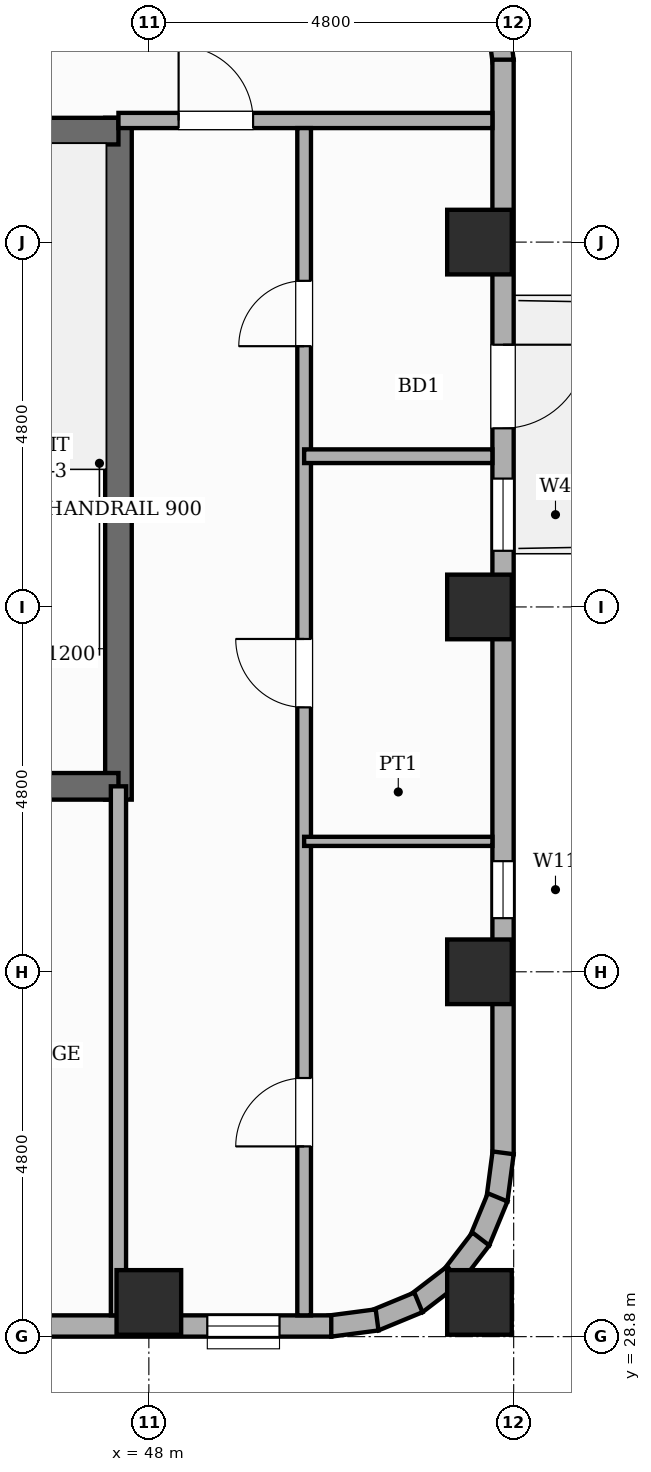
"""IFC4 building model, lengths in metres.
Left out: names, types, materials, properties, quantities, classifications, styles, units other than length and angle.
Written with IfcOpenShell. Run it as: python <this file> out.ifc"""

import sys

from ifc_helpers import new_model, si_unit, direction, frame, frame_2d, origin, origin_2d, place, context, subcontext, project, spatial, rectangle, extrude, element, fill, save


model = new_model("IFC4")
c1 = context("Model", 3, precision=1e-05, world=origin(), true_north=direction((0.0, 1.0)))
c2 = subcontext(c1, "Body", "Model", "MODEL_VIEW")
j1 = project(units=[si_unit("LENGTHUNIT", "METRE"), si_unit("PLANEANGLEUNIT", "RADIAN")], contexts=[c1])
p1 = place(None, origin())
s1 = spatial("IfcSite", under=j1, at=p1, CompositionType="ELEMENT")
p2 = place(p1, origin())
s2 = spatial("IfcBuilding", under=s1, at=p2, CompositionType="ELEMENT")
p3 = place(p2, frame((0.0, 0.0, 207.4)))
s3 = spatial("IfcBuildingStorey", under=s2, at=p3, CompositionType="ELEMENT", Elevation=207.4)
p4 = place(p3, frame((47.6, 35.865, 0.0), z_axis=(0.0, 0.0, 1.0), x_axis=(0.0, 1.0, 0.0)))
e1 = element("IfcWall", 1, at=p4, inside=s3, PredefinedType="SHEAR", context=c2, shape_type="SweptSolid", body=[
    extrude(rectangle(XDim=8.97, YDim=0.35, at=frame_2d((4.485, 0.0))), origin(), (0.0, 0.0, 1.0), 3.6),
])
for number, where, z_axis, x_axis in (
    (2, (44.02, 36.04, 0.0), (0.0, 0.0, 1.0), (1.0, 0.0, 0.0)),
    (3, (44.02, 44.66, 0.0), (0.0, 0.0, 1.0), (1.0, 0.0, 0.0)),
):
    element("IfcWall", number, at=place(p3, frame(where, z_axis=z_axis, x_axis=x_axis)), inside=s3, PredefinedType="SHEAR", context=c2, shape_type="SweptSolid", body=[
        extrude(rectangle(XDim=3.58, YDim=0.35, at=frame_2d((1.79, 0.0))), origin(), (0.0, 0.0, 1.0), 3.6),
    ])
for number, where, z_axis, x_axis in (
    (4, (48.0, 29.25, 0.0), (0.0, 0.0, 1.0), (1.0, 0.0, 0.0)),
    (5, (52.35, 29.25, 0.0), (0.0, 0.0, 1.0), (1.0, 0.0, 0.0)),
    (6, (52.35, 33.6, 0.0), (0.0, 0.0, 1.0), (1.0, 0.0, 0.0)),
    (7, (52.35, 38.4, 0.0), (0.0, 0.0, 1.0), (1.0, 0.0, 0.0)),
    (8, (52.35, 43.2, 0.0), (0.0, 0.0, 1.0), (1.0, 0.0, 0.0)),
):
    element("IfcColumn", number, at=place(p3, frame(where, z_axis=z_axis, x_axis=x_axis)), inside=s3, PredefinedType="COLUMN", context=c2, shape_type="SweptSolid", body=[
        extrude(rectangle(XDim=0.85, YDim=0.85, at=origin_2d()), origin(), (0.0, 0.0, 1.0), 3.6),
    ])
p5 = place(p3, frame((52.579, 46.203, 0.0), z_axis=(0.0, 0.0, 1.0), x_axis=(0.130555323746, -0.9914410257, 0.0)))
e9 = element("IfcWall", 9, at=p5, inside=s3, PredefinedType="STANDARD", context=c2, shape_type="SweptSolid", body=[
    extrude(rectangle(XDim=0.626, YDim=0.28, at=frame_2d((0.313, 0.0))), origin(), (0.0, 0.0, 1.0), 2.66),
])
p6 = place(p3, frame((52.66, 45.6, 0.0), z_axis=(0.0, 0.0, 1.0), x_axis=(0.0, -1.0, 0.0)))
e10 = element("IfcWall", 10, at=p6, inside=s3, PredefinedType="STANDARD", context=c2, shape_type="SweptSolid", body=[
    extrude(rectangle(XDim=14.4, YDim=0.28, at=frame_2d((7.2, 0.0))), origin(), (0.0, 0.0, 1.0), 2.66),
])
p7 = place(p6, frame((3.75, 0.0, 0.0)))
e11 = element("IfcOpeningElement", 11, at=p7, cuts=e10, PredefinedType="OPENING", context=c2, shape_type="SweptSolid", body=[
    extrude(rectangle(XDim=1.1, YDim=2.15, at=frame_2d((0.55, 1.075))), frame((0.0, 0.15, 0.0), z_axis=(0.0, -1.0, 0.0), x_axis=(1.0, 0.0, 0.0)), (0.0, 0.0, 1.0), 0.3),
])
p8 = place(p6, frame((10.544, 0.0, 0.45)))
e12 = element("IfcOpeningElement", 12, at=p8, cuts=e10, PredefinedType="OPENING", context=c2, shape_type="SweptSolid", body=[
    extrude(rectangle(XDim=0.75, YDim=1.8, at=frame_2d((0.375, 0.9))), frame((0.0, 0.15, 0.0), z_axis=(0.0, -1.0, 0.0), x_axis=(1.0, 0.0, 0.0)), (0.0, 0.0, 1.0), 0.3),
])
p9 = place(p6, frame((5.511, 0.0, 0.45)))
e13 = element("IfcOpeningElement", 13, at=p9, cuts=e10, PredefinedType="OPENING", context=c2, shape_type="SweptSolid", body=[
    extrude(rectangle(XDim=0.95, YDim=1.8, at=frame_2d((0.475, 0.9))), frame((0.0, 0.15, 0.0), z_axis=(0.0, -1.0, 0.0), x_axis=(1.0, 0.0, 0.0)), (0.0, 0.0, 1.0), 0.3),
])
p10 = place(p3, frame((52.661, 31.218, 0.0), z_axis=(0.0, 0.0, 1.0), x_axis=(-0.130555323746, -0.9914410257, 0.0)))
e14 = element("IfcWall", 14, at=p10, inside=s3, PredefinedType="STANDARD", context=c2, shape_type="SweptSolid", body=[
    extrude(rectangle(XDim=0.626, YDim=0.28, at=frame_2d((0.313, 0.0))), origin(), (0.0, 0.0, 1.0), 2.66),
])
p11 = place(p3, frame((52.589, 30.632, 0.0), z_axis=(0.0, 0.0, 1.0), x_axis=(-0.382787856107, -0.923836271867, 0.0)))
e15 = element("IfcWall", 15, at=p11, inside=s3, PredefinedType="STANDARD", context=c2, shape_type="SweptSolid", body=[
    extrude(rectangle(XDim=0.626, YDim=0.28, at=frame_2d((0.313, 0.0))), origin(), (0.0, 0.0, 1.0), 2.66),
])
for number, where, z_axis, x_axis in (
    (16, (52.367, 30.085, 0.0), (0.0, 0.0, 1.0), (-0.609, -0.793, 0.0)),
    (17, (52.012, 29.614, 0.0), (0.0, 0.0, 1.0), (-0.793, -0.609, 0.0)),
    (18, (51.546, 29.251, 0.0), (0.0, 0.0, 1.0), (-0.924, -0.383, 0.0)),
):
    element("IfcWall", number, at=place(p3, frame(where, z_axis=z_axis, x_axis=x_axis)), inside=s3, PredefinedType="STANDARD", context=c2, shape_type="SweptSolid", body=[
        extrude(rectangle(XDim=0.626, YDim=0.28, at=frame_2d((0.313, 0.0))), origin(), (0.0, 0.0, 1.0), 2.66),
    ])
p12 = place(p3, frame((51.003, 29.021, 0.0), z_axis=(0.0, 0.0, 1.0), x_axis=(-0.991447664465, -0.130504898859, 0.0)))
e19 = element("IfcWall", 19, at=p12, inside=s3, PredefinedType="STANDARD", context=c2, shape_type="SweptSolid", body=[
    extrude(rectangle(XDim=0.627, YDim=0.28, at=frame_2d((0.313, 0.0))), origin(), (0.0, 0.0, 1.0), 2.66),
])
p13 = place(p3, frame((50.4, 28.94, 0.0), z_axis=(0.0, 0.0, 1.0), x_axis=(-1.0, 0.0, 0.0)))
e20 = element("IfcWall", 20, at=p13, inside=s3, PredefinedType="STANDARD", context=c2, shape_type="SweptSolid", body=[
    extrude(rectangle(XDim=24.0, YDim=0.28, at=frame_2d((12.0, 0.0))), origin(), (0.0, 0.0, 1.0), 2.66),
])
p14 = place(p13, frame((17.61, 0.0, 0.45)))
e21 = element("IfcOpeningElement", 21, at=p14, cuts=e20, PredefinedType="OPENING", context=c2, shape_type="SweptSolid", body=[
    extrude(rectangle(XDim=0.95, YDim=1.8, at=frame_2d((0.475, 0.9))), frame((0.0, 0.15, 0.0), z_axis=(0.0, -1.0, 0.0), x_axis=(1.0, 0.0, 0.0)), (0.0, 0.0, 1.0), 0.3),
])
p15 = place(p13, frame((9.438, 0.0, 0.65)))
e22 = element("IfcOpeningElement", 22, at=p15, cuts=e20, PredefinedType="OPENING", context=c2, shape_type="SweptSolid", body=[
    extrude(rectangle(XDim=1.4, YDim=1.1, at=frame_2d((0.7, 0.55))), frame((0.0, 0.15, 0.0), z_axis=(0.0, -1.0, 0.0), x_axis=(1.0, 0.0, 0.0)), (0.0, 0.0, 1.0), 0.3),
])
p16 = place(p13, frame((22.555, 0.0, 0.45)))
e23 = element("IfcOpeningElement", 23, at=p16, cuts=e20, PredefinedType="OPENING", context=c2, shape_type="SweptSolid", body=[
    extrude(rectangle(XDim=0.95, YDim=1.8, at=frame_2d((0.475, 0.9))), frame((0.0, 0.15, 0.0), z_axis=(0.0, -1.0, 0.0), x_axis=(1.0, 0.0, 0.0)), (0.0, 0.0, 1.0), 0.3),
])
p17 = place(p13, frame((4.1, 0.0, 0.65)))
e24 = element("IfcOpeningElement", 24, at=p17, cuts=e20, PredefinedType="OPENING", context=c2, shape_type="SweptSolid", body=[
    extrude(rectangle(XDim=1.4, YDim=1.1, at=frame_2d((0.7, 0.55))), frame((0.0, 0.15, 0.0), z_axis=(0.0, -1.0, 0.0), x_axis=(1.0, 0.0, 0.0)), (0.0, 0.0, 1.0), 0.3),
])
p18 = place(p13, frame((19.34, 0.0, 0.65)))
e25 = element("IfcOpeningElement", 25, at=p18, cuts=e20, PredefinedType="OPENING", context=c2, shape_type="SweptSolid", body=[
    extrude(rectangle(XDim=1.4, YDim=1.1, at=frame_2d((0.7, 0.55))), frame((0.0, 0.15, 0.0), z_axis=(0.0, -1.0, 0.0), x_axis=(1.0, 0.0, 0.0)), (0.0, 0.0, 1.0), 0.3),
])
p19 = place(p13, frame((13.76, 0.0, 0.65)))
e26 = element("IfcOpeningElement", 26, at=p19, cuts=e20, PredefinedType="OPENING", context=c2, shape_type="SweptSolid", body=[
    extrude(rectangle(XDim=1.4, YDim=1.1, at=frame_2d((0.7, 0.55))), frame((0.0, 0.15, 0.0), z_axis=(0.0, -1.0, 0.0), x_axis=(1.0, 0.0, 0.0)), (0.0, 0.0, 1.0), 0.3),
])
p20 = place(p13, frame((0.681, 0.0, 0.45)))
e27 = element("IfcOpeningElement", 27, at=p20, cuts=e20, PredefinedType="OPENING", context=c2, shape_type="SweptSolid", body=[
    extrude(rectangle(XDim=0.95, YDim=1.8, at=frame_2d((0.475, 0.9))), frame((0.0, 0.15, 0.0), z_axis=(0.0, -1.0, 0.0), x_axis=(1.0, 0.0, 0.0)), (0.0, 0.0, 1.0), 0.3),
])
p21 = place(p3, frame((47.6, 44.8, 0.0), z_axis=(0.0, 0.0, 1.0), x_axis=(1.0, 0.0, 0.0)))
e28 = element("IfcWall", 28, at=p21, inside=s3, PredefinedType="PARTITIONING", context=c2, shape_type="SweptSolid", body=[
    extrude(rectangle(XDim=4.92, YDim=0.2, at=frame_2d((2.46, 0.0))), origin(), (0.0, 0.0, 1.0), 3.38),
])
p22 = place(p21, frame((0.792, 0.0, 0.0)))
e29 = element("IfcOpeningElement", 29, at=p22, cuts=e28, PredefinedType="OPENING", context=c2, shape_type="SweptSolid", body=[
    extrude(rectangle(XDim=0.98, YDim=2.18, at=frame_2d((0.49, 1.09))), frame((0.0, 0.11, 0.0), z_axis=(0.0, -1.0, 0.0), x_axis=(1.0, 0.0, 0.0)), (0.0, 0.0, 1.0), 0.22),
])
p23 = place(p3, frame((47.6, 29.08, 0.0), z_axis=(0.0, 0.0, 1.0), x_axis=(0.0, 1.0, 0.0)))
e30 = element("IfcWall", 30, at=p23, inside=s3, PredefinedType="SOLIDWALL", context=c2, shape_type="SweptSolid", body=[
    extrude(rectangle(XDim=6.96, YDim=0.2, at=frame_2d((3.48, 0.0))), origin(), (0.0, 0.0, 1.0), 3.38),
])
p24 = place(p3, frame((50.043, 29.08, 0.0), z_axis=(0.0, 0.0, 1.0), x_axis=(0.0, 1.0, 0.0)))
e31 = element("IfcWall", 31, at=p24, inside=s3, PredefinedType="PLUMBINGWALL", context=c2, shape_type="SweptSolid", body=[
    extrude(rectangle(XDim=15.62, YDim=0.18, at=frame_2d((7.81, 0.0))), origin(), (0.0, 0.0, 1.0), 3.38),
])
p25 = place(p24, frame((2.223, 0.0, 0.0)))
e32 = element("IfcOpeningElement", 32, at=p25, cuts=e31, PredefinedType="OPENING", context=c2, shape_type="SweptSolid", body=[
    extrude(rectangle(XDim=0.9, YDim=2.15, at=frame_2d((0.45, 1.075))), frame((0.0, 0.1, 0.0), z_axis=(0.0, -1.0, 0.0), x_axis=(1.0, 0.0, 0.0)), (0.0, 0.0, 1.0), 0.2),
])
p26 = place(p24, frame((7.999, 0.0, 0.0)))
e33 = element("IfcOpeningElement", 33, at=p26, cuts=e31, PredefinedType="OPENING", context=c2, shape_type="SweptSolid", body=[
    extrude(rectangle(XDim=0.9, YDim=2.15, at=frame_2d((0.45, 1.075))), frame((0.0, 0.1, 0.0), z_axis=(0.0, -1.0, 0.0), x_axis=(1.0, 0.0, 0.0)), (0.0, 0.0, 1.0), 0.2),
])
p27 = place(p24, frame((12.75, 0.0, 0.0)))
e34 = element("IfcOpeningElement", 34, at=p27, cuts=e31, PredefinedType="OPENING", context=c2, shape_type="SweptSolid", body=[
    extrude(rectangle(XDim=0.86, YDim=2.1, at=frame_2d((0.43, 1.05))), frame((0.0, 0.1, 0.0), z_axis=(0.0, -1.0, 0.0), x_axis=(1.0, 0.0, 0.0)), (0.0, 0.0, 1.0), 0.2),
])
p28 = place(p3, frame((50.043, 35.316, 0.0), z_axis=(0.0, 0.0, 1.0), x_axis=(1.0, 0.0, 0.0)))
e35 = element("IfcWall", 35, at=p28, inside=s3, PredefinedType="PARTITIONING", context=c2, shape_type="SweptSolid", body=[
    extrude(rectangle(XDim=2.477, YDim=0.12, at=frame_2d((1.239, 0.0))), origin(), (0.0, 0.0, 1.0), 3.38),
])
p29 = place(p3, frame((50.043, 40.383, 0.0), z_axis=(0.0, 0.0, 1.0), x_axis=(1.0, 0.0, 0.0)))
e36 = element("IfcWall", 36, at=p29, inside=s3, PredefinedType="PLUMBINGWALL", context=c2, shape_type="SweptSolid", body=[
    extrude(rectangle(XDim=2.477, YDim=0.18, at=frame_2d((1.239, 0.0))), origin(), (0.0, 0.0, 1.0), 3.38),
])
p30 = place(p7, origin())
e37 = element("IfcDoor", 37, at=p30, inside=s3, OperationType="SINGLE_SWING_LEFT", PredefinedType="DOOR", context=c2, shape_type="SweptSolid", body=[
    extrude(rectangle(XDim=1.1, YDim=2.15, at=frame_2d((0.55, 1.075))), frame((0.0, 0.025, 0.0), z_axis=(0.0, -1.0, 0.0), x_axis=(1.0, 0.0, 0.0)), (0.0, 0.0, 1.0), 0.05),
])
fill(e11, e37)
p31 = place(p8, origin())
e38 = element("IfcWindow", 38, at=p31, inside=s3, PartitioningType="SINGLE_PANEL", PredefinedType="WINDOW", context=c2, shape_type="SweptSolid", body=[
    extrude(rectangle(XDim=0.75, YDim=1.8, at=frame_2d((0.375, 0.9))), frame((0.0, 0.03, 0.0), z_axis=(0.0, -1.0, 0.0), x_axis=(1.0, 0.0, 0.0)), (0.0, 0.0, 1.0), 0.06),
])
fill(e12, e38)
p32 = place(p9, origin())
e39 = element("IfcWindow", 39, at=p32, inside=s3, PartitioningType="SINGLE_PANEL", PredefinedType="WINDOW", context=c2, shape_type="SweptSolid", body=[
    extrude(rectangle(XDim=0.95, YDim=1.8, at=frame_2d((0.475, 0.9))), frame((0.0, 0.03, 0.0), z_axis=(0.0, -1.0, 0.0), x_axis=(1.0, 0.0, 0.0)), (0.0, 0.0, 1.0), 0.06),
])
fill(e13, e39)
p33 = place(p20, origin())
e40 = element("IfcWindow", 40, at=p33, inside=s3, PartitioningType="SINGLE_PANEL", PredefinedType="WINDOW", context=c2, shape_type="SweptSolid", body=[
    extrude(rectangle(XDim=0.95, YDim=1.8, at=frame_2d((0.475, 0.9))), frame((0.0, 0.03, 0.0), z_axis=(0.0, -1.0, 0.0), x_axis=(1.0, 0.0, 0.0)), (0.0, 0.0, 1.0), 0.06),
])
fill(e27, e40)
p34 = place(p22, origin())
e41 = element("IfcDoor", 41, at=p34, inside=s3, OperationType="SINGLE_SWING_LEFT", PredefinedType="DOOR", context=c2, shape_type="SweptSolid", body=[
    extrude(rectangle(XDim=0.98, YDim=2.18, at=frame_2d((0.49, 1.09))), frame((0.0, 0.025, 0.0), z_axis=(0.0, -1.0, 0.0), x_axis=(1.0, 0.0, 0.0)), (0.0, 0.0, 1.0), 0.05),
])
fill(e29, e41)
p35 = place(p25, origin())
e42 = element("IfcDoor", 42, at=p35, inside=s3, OperationType="SINGLE_SWING_LEFT", PredefinedType="DOOR", context=c2, shape_type="SweptSolid", body=[
    extrude(rectangle(XDim=0.9, YDim=2.15, at=frame_2d((0.45, 1.075))), frame((0.0, 0.025, 0.0), z_axis=(0.0, -1.0, 0.0), x_axis=(1.0, 0.0, 0.0)), (0.0, 0.0, 1.0), 0.05),
])
fill(e32, e42)
p36 = place(p26, origin())
e43 = element("IfcDoor", 43, at=p36, inside=s3, OperationType="SINGLE_SWING_RIGHT", PredefinedType="DOOR", context=c2, shape_type="SweptSolid", body=[
    extrude(rectangle(XDim=0.9, YDim=2.15, at=frame_2d((0.45, 1.075))), frame((0.0, 0.025, 0.0), z_axis=(0.0, -1.0, 0.0), x_axis=(1.0, 0.0, 0.0)), (0.0, 0.0, 1.0), 0.05),
])
fill(e33, e43)
p37 = place(p27, origin())
e44 = element("IfcDoor", 44, at=p37, inside=s3, OperationType="SINGLE_SWING_LEFT", PredefinedType="DOOR", context=c2, shape_type="SweptSolid", body=[
    extrude(rectangle(XDim=0.86, YDim=2.1, at=frame_2d((0.43, 1.05))), frame((0.0, 0.025, 0.0), z_axis=(0.0, -1.0, 0.0), x_axis=(1.0, 0.0, 0.0)), (0.0, 0.0, 1.0), 0.05),
])
fill(e34, e44)
save(model, sys.argv[1])
